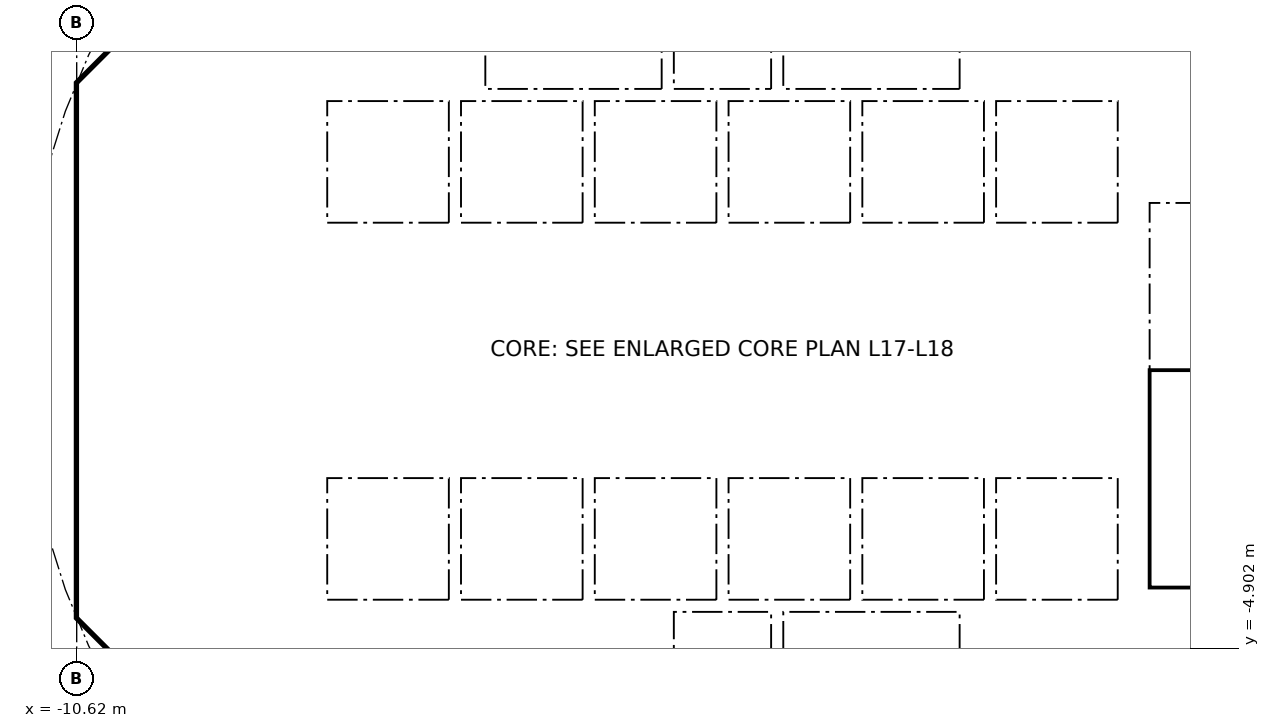
"""IFC4 building model, lengths in metres.
Left out: names, types, materials, properties, quantities, classifications, styles, units other than length and angle.
Written with IfcOpenShell. Run it as: python <this file> out.ifc"""

import sys

from ifc_helpers import new_model, si_unit, direction, frame, frame_2d, origin, place, context, subcontext, project, spatial, polyline, rectangle, outline, extrude, element, fill, save


model = new_model("IFC4")
c1 = context("Model", 3, precision=1e-05, world=origin(), true_north=direction((0.0, 1.0)))
c2 = subcontext(c1, "Body", "Model", "MODEL_VIEW")
j1 = project(units=[si_unit("LENGTHUNIT", "METRE"), si_unit("PLANEANGLEUNIT", "RADIAN")], contexts=[c1])
p1 = place(None, origin())
s1 = spatial("IfcSite", under=j1, at=p1, CompositionType="ELEMENT")
p2 = place(p1, origin())
s2 = spatial("IfcBuilding", under=s1, at=p2, CompositionType="ELEMENT")
p3 = place(p2, frame((0.0, 0.0, 73.3)))
s3 = spatial("IfcBuildingStorey", under=s2, at=p3, CompositionType="ELEMENT", Elevation=73.3)
p4 = place(p3, frame((9.988, 4.613, 0.0), z_axis=(0.0, 0.0, 1.0), x_axis=(-0.707106781187, 0.707106781187, 0.0)))
e1 = element("IfcWall", 1, at=p4, inside=s3, PredefinedType="SHEAR", context=c2, shape_type="SweptSolid", body=[
    extrude(rectangle(XDim=7.602, YDim=0.6, at=frame_2d((3.801, 0.0))), origin(), (0.0, 0.0, 1.0), 3.44),
])
p5 = place(p4, frame((3.201, 0.0, 0.0)))
e2 = element("IfcOpeningElement", 2, at=p5, cuts=e1, PredefinedType="OPENING", context=c2, shape_type="SweptSolid", body=[
    extrude(rectangle(XDim=1.2, YDim=2.1, at=frame_2d((0.6, 1.05))), frame((0.0, 0.31, 0.0), z_axis=(0.0, -1.0, 0.0), x_axis=(1.0, 0.0, 0.0)), (0.0, 0.0, 1.0), 0.62),
])
p6 = place(p3, frame((-4.613, 9.988, 0.0), z_axis=(0.0, 0.0, 1.0), x_axis=(-0.707106781187, -0.707106781187, 0.0)))
e3 = element("IfcWall", 3, at=p6, inside=s3, PredefinedType="SHEAR", context=c2, shape_type="SweptSolid", body=[
    extrude(rectangle(XDim=7.602, YDim=0.6, at=frame_2d((3.801, 0.0))), origin(), (0.0, 0.0, 1.0), 3.44),
])
p7 = place(p6, frame((0.351, 0.0, 0.0)))
e4 = element("IfcOpeningElement", 4, at=p7, cuts=e3, PredefinedType="OPENING", context=c2, shape_type="SweptSolid", body=[
    extrude(rectangle(XDim=1.1, YDim=2.1, at=frame_2d((0.55, 1.05))), frame((0.0, 0.31, 0.0), z_axis=(0.0, -1.0, 0.0), x_axis=(1.0, 0.0, 0.0)), (0.0, 0.0, 1.0), 0.62),
])
p8 = place(p3, frame((-10.325, 3.801, 0.0), z_axis=(0.0, 0.0, 1.0), x_axis=(0.0, -1.0, 0.0)))
e5 = element("IfcWall", 5, at=p8, inside=s3, PredefinedType="SHEAR", context=c2, shape_type="SweptSolid", body=[
    extrude(rectangle(XDim=7.602, YDim=0.6, at=frame_2d((3.801, 0.0))), origin(), (0.0, 0.0, 1.0), 3.44),
])
p9 = place(p8, frame((0.651, 0.0, 0.0)))
e6 = element("IfcOpeningElement", 6, at=p9, cuts=e5, PredefinedType="OPENING", context=c2, shape_type="SweptSolid", body=[
    extrude(rectangle(XDim=1.5, YDim=2.1, at=frame_2d((0.75, 1.05))), frame((0.0, 0.31, 0.0), z_axis=(0.0, -1.0, 0.0), x_axis=(1.0, 0.0, 0.0)), (0.0, 0.0, 1.0), 0.62),
])
p10 = place(p8, frame((5.451, 0.0, 0.0)))
e7 = element("IfcOpeningElement", 7, at=p10, cuts=e5, PredefinedType="OPENING", context=c2, shape_type="SweptSolid", body=[
    extrude(rectangle(XDim=1.5, YDim=2.1, at=frame_2d((0.75, 1.05))), frame((0.0, 0.31, 0.0), z_axis=(0.0, -1.0, 0.0), x_axis=(1.0, 0.0, 0.0)), (0.0, 0.0, 1.0), 0.62),
])
p11 = place(p3, frame((-9.988, -4.613, 0.0), z_axis=(0.0, 0.0, 1.0), x_axis=(0.707106781187, -0.707106781187, 0.0)))
e8 = element("IfcWall", 8, at=p11, inside=s3, PredefinedType="SHEAR", context=c2, shape_type="SweptSolid", body=[
    extrude(rectangle(XDim=7.602, YDim=0.6, at=frame_2d((3.801, 0.0))), origin(), (0.0, 0.0, 1.0), 3.44),
])
p12 = place(p11, frame((6.151, 0.0, 0.0)))
e9 = element("IfcOpeningElement", 9, at=p12, cuts=e8, PredefinedType="OPENING", context=c2, shape_type="SweptSolid", body=[
    extrude(rectangle(XDim=1.1, YDim=2.1, at=frame_2d((0.55, 1.05))), frame((0.0, 0.31, 0.0), z_axis=(0.0, -1.0, 0.0), x_axis=(1.0, 0.0, 0.0)), (0.0, 0.0, 1.0), 0.62),
])
p13 = place(p3, frame((4.613, -9.988, 0.0), z_axis=(0.0, 0.0, 1.0), x_axis=(0.707106781187, 0.707106781187, 0.0)))
e10 = element("IfcWall", 10, at=p13, inside=s3, PredefinedType="SHEAR", context=c2, shape_type="SweptSolid", body=[
    extrude(rectangle(XDim=7.602, YDim=0.6, at=frame_2d((3.801, 0.0))), origin(), (0.0, 0.0, 1.0), 3.44),
])
p14 = place(p13, frame((3.201, 0.0, 0.0)))
e11 = element("IfcOpeningElement", 11, at=p14, cuts=e10, PredefinedType="OPENING", context=c2, shape_type="SweptSolid", body=[
    extrude(rectangle(XDim=1.2, YDim=2.1, at=frame_2d((0.6, 1.05))), frame((0.0, 0.31, 0.0), z_axis=(0.0, -1.0, 0.0), x_axis=(1.0, 0.0, 0.0)), (0.0, 0.0, 1.0), 0.62),
])
p15 = place(p3, frame((-6.2, 4.3, 0.0), z_axis=(0.0, 0.0, 1.0), x_axis=(0.0, 1.0, 0.0)))
e12 = element("IfcWall", 12, at=p15, inside=s3, PredefinedType="PARTITIONING", context=c2, shape_type="SweptSolid", body=[
    extrude(rectangle(XDim=3.527, YDim=0.15, at=frame_2d((1.763, 0.0))), origin(), (0.0, 0.0, 1.0), 3.44),
])
p16 = place(p15, frame((0.262, 0.0, 0.0)))
e13 = element("IfcOpeningElement", 13, at=p16, cuts=e12, PredefinedType="OPENING", context=c2, shape_type="SweptSolid", body=[
    extrude(rectangle(XDim=0.9, YDim=2.1, at=frame_2d((0.45, 1.05))), frame((0.0, 0.085, 0.0), z_axis=(0.0, -1.0, 0.0), x_axis=(1.0, 0.0, 0.0)), (0.0, 0.0, 1.0), 0.17),
])
p17 = place(p15, frame((2.138, 0.0, 0.0)))
e14 = element("IfcOpeningElement", 14, at=p17, cuts=e12, PredefinedType="OPENING", context=c2, shape_type="SweptSolid", body=[
    extrude(rectangle(XDim=0.9, YDim=2.1, at=frame_2d((0.45, 1.05))), frame((0.0, 0.085, 0.0), z_axis=(0.0, -1.0, 0.0), x_axis=(1.0, 0.0, 0.0)), (0.0, 0.0, 1.0), 0.17),
])
p18 = place(p3, frame((4.0, 4.3, 0.0), z_axis=(0.0, 0.0, 1.0), x_axis=(0.0, 1.0, 0.0)))
e15 = element("IfcWall", 15, at=p18, inside=s3, PredefinedType="SOLIDWALL", context=c2, shape_type="SweptSolid", body=[
    extrude(rectangle(XDim=2.2, YDim=0.2, at=frame_2d((1.1, 0.0))), origin(), (0.0, 0.0, 1.0), 3.44),
])
p19 = place(p18, frame((0.55, 0.0, 0.0)))
e16 = element("IfcOpeningElement", 16, at=p19, cuts=e15, PredefinedType="OPENING", context=c2, shape_type="SweptSolid", body=[
    extrude(rectangle(XDim=1.1, YDim=2.1, at=frame_2d((0.55, 1.05))), frame((0.0, 0.11, 0.0), z_axis=(0.0, -1.0, 0.0), x_axis=(1.0, 0.0, 0.0)), (0.0, 0.0, 1.0), 0.22),
])
p20 = place(p3, frame((-4.0, 4.3, 0.0), z_axis=(0.0, 0.0, 1.0), x_axis=(0.0, 1.0, 0.0)))
e17 = element("IfcWall", 17, at=p20, inside=s3, PredefinedType="SOLIDWALL", context=c2, shape_type="SweptSolid", body=[
    extrude(rectangle(XDim=2.2, YDim=0.2, at=frame_2d((1.1, 0.0))), origin(), (0.0, 0.0, 1.0), 3.44),
])
p21 = place(p20, frame((0.55, 0.0, 0.0)))
e18 = element("IfcOpeningElement", 18, at=p21, cuts=e17, PredefinedType="OPENING", context=c2, shape_type="SweptSolid", body=[
    extrude(rectangle(XDim=1.1, YDim=2.1, at=frame_2d((0.55, 1.05))), frame((0.0, 0.11, 0.0), z_axis=(0.0, -1.0, 0.0), x_axis=(1.0, 0.0, 0.0)), (0.0, 0.0, 1.0), 0.22),
])
p22 = place(p3, frame((-6.7, 2.0, 0.0), z_axis=(0.0, 0.0, 1.0), x_axis=(1.0, 0.0, 0.0)))
e19 = element("IfcWall", 19, at=p22, inside=s3, PredefinedType="SOLIDWALL", context=c2, shape_type="SweptSolid", body=[
    extrude(rectangle(XDim=13.4, YDim=0.2, at=frame_2d((6.7, 0.0))), origin(), (0.0, 0.0, 1.0), 3.44),
])
p23 = place(p22, frame((0.65, 0.0, 0.0)))
e20 = element("IfcOpeningElement", 20, at=p23, cuts=e19, PredefinedType="OPENING", context=c2, shape_type="SweptSolid", body=[
    extrude(rectangle(XDim=1.1, YDim=2.1, at=frame_2d((0.55, 1.05))), frame((0.0, 0.11, 0.0), z_axis=(0.0, -1.0, 0.0), x_axis=(1.0, 0.0, 0.0)), (0.0, 0.0, 1.0), 0.22),
])
p24 = place(p22, frame((2.85, 0.0, 0.0)))
e21 = element("IfcOpeningElement", 21, at=p24, cuts=e19, PredefinedType="OPENING", context=c2, shape_type="SweptSolid", body=[
    extrude(rectangle(XDim=1.1, YDim=2.1, at=frame_2d((0.55, 1.05))), frame((0.0, 0.11, 0.0), z_axis=(0.0, -1.0, 0.0), x_axis=(1.0, 0.0, 0.0)), (0.0, 0.0, 1.0), 0.22),
])
p25 = place(p22, frame((5.05, 0.0, 0.0)))
e22 = element("IfcOpeningElement", 22, at=p25, cuts=e19, PredefinedType="OPENING", context=c2, shape_type="SweptSolid", body=[
    extrude(rectangle(XDim=1.1, YDim=2.1, at=frame_2d((0.55, 1.05))), frame((0.0, 0.11, 0.0), z_axis=(0.0, -1.0, 0.0), x_axis=(1.0, 0.0, 0.0)), (0.0, 0.0, 1.0), 0.22),
])
p26 = place(p3, frame((6.7, 4.0, 0.0), z_axis=(0.0, 0.0, 1.0), x_axis=(1.0, 0.0, 0.0)))
e23 = element("IfcWall", 23, at=p26, inside=s3, PredefinedType="SOLIDWALL", context=c2, shape_type="SweptSolid", body=[
    extrude(rectangle(XDim=3.325, YDim=0.2, at=frame_2d((1.662, 0.0))), origin(), (0.0, 0.0, 1.0), 3.44),
])
p27 = place(p26, frame((1.25, 0.0, 0.0)))
e24 = element("IfcOpeningElement", 24, at=p27, cuts=e23, PredefinedType="OPENING", context=c2, shape_type="SweptSolid", body=[
    extrude(rectangle(XDim=1.1, YDim=2.1, at=frame_2d((0.55, 1.05))), frame((0.0, 0.11, 0.0), z_axis=(0.0, -1.0, 0.0), x_axis=(1.0, 0.0, 0.0)), (0.0, 0.0, 1.0), 0.22),
])
p28 = place(p3, frame((-7.0, -7.027, 0.0), z_axis=(0.0, 0.0, 1.0), x_axis=(0.0, 1.0, 0.0)))
e25 = element("IfcWall", 25, at=p28, inside=s3, PredefinedType="PARTITIONING", context=c2, shape_type="SweptSolid", body=[
    extrude(rectangle(XDim=2.927, YDim=0.15, at=frame_2d((1.463, 0.0))), origin(), (0.0, 0.0, 1.0), 3.44),
])
p29 = place(p28, frame((0.976, 0.0, 0.0)))
e26 = element("IfcOpeningElement", 26, at=p29, cuts=e25, PredefinedType="OPENING", context=c2, shape_type="SweptSolid", body=[
    extrude(rectangle(XDim=0.9, YDim=2.1, at=frame_2d((0.45, 1.05))), frame((0.0, 0.085, 0.0), z_axis=(0.0, -1.0, 0.0), x_axis=(1.0, 0.0, 0.0)), (0.0, 0.0, 1.0), 0.17),
])
p30 = place(p3, frame((4.0, -6.5, 0.0), z_axis=(0.0, 0.0, 1.0), x_axis=(0.0, 1.0, 0.0)))
e27 = element("IfcWall", 27, at=p30, inside=s3, PredefinedType="SOLIDWALL", context=c2, shape_type="SweptSolid", body=[
    extrude(rectangle(XDim=2.2, YDim=0.2, at=frame_2d((1.1, 0.0))), origin(), (0.0, 0.0, 1.0), 3.44),
])
p31 = place(p30, frame((0.55, 0.0, 0.0)))
e28 = element("IfcOpeningElement", 28, at=p31, cuts=e27, PredefinedType="OPENING", context=c2, shape_type="SweptSolid", body=[
    extrude(rectangle(XDim=1.1, YDim=2.1, at=frame_2d((0.55, 1.05))), frame((0.0, 0.11, 0.0), z_axis=(0.0, -1.0, 0.0), x_axis=(1.0, 0.0, 0.0)), (0.0, 0.0, 1.0), 0.22),
])
p32 = place(p3, frame((-4.0, -6.5, 0.0), z_axis=(0.0, 0.0, 1.0), x_axis=(0.0, 1.0, 0.0)))
e29 = element("IfcWall", 29, at=p32, inside=s3, PredefinedType="SOLIDWALL", context=c2, shape_type="SweptSolid", body=[
    extrude(rectangle(XDim=2.2, YDim=0.2, at=frame_2d((1.1, 0.0))), origin(), (0.0, 0.0, 1.0), 3.44),
])
p33 = place(p32, frame((0.65, 0.0, 0.0)))
e30 = element("IfcOpeningElement", 30, at=p33, cuts=e29, PredefinedType="OPENING", context=c2, shape_type="SweptSolid", body=[
    extrude(rectangle(XDim=0.9, YDim=2.1, at=frame_2d((0.45, 1.05))), frame((0.0, 0.11, 0.0), z_axis=(0.0, -1.0, 0.0), x_axis=(1.0, 0.0, 0.0)), (0.0, 0.0, 1.0), 0.22),
])
p34 = place(p3, frame((-6.7, -2.0, 0.0), z_axis=(0.0, 0.0, 1.0), x_axis=(1.0, 0.0, 0.0)))
e31 = element("IfcWall", 31, at=p34, inside=s3, PredefinedType="SOLIDWALL", context=c2, shape_type="SweptSolid", body=[
    extrude(rectangle(XDim=13.4, YDim=0.2, at=frame_2d((6.7, 0.0))), origin(), (0.0, 0.0, 1.0), 3.44),
])
p35 = place(p34, frame((0.65, 0.0, 0.0)))
e32 = element("IfcOpeningElement", 32, at=p35, cuts=e31, PredefinedType="OPENING", context=c2, shape_type="SweptSolid", body=[
    extrude(rectangle(XDim=1.1, YDim=2.1, at=frame_2d((0.55, 1.05))), frame((0.0, 0.11, 0.0), z_axis=(0.0, -1.0, 0.0), x_axis=(1.0, 0.0, 0.0)), (0.0, 0.0, 1.0), 0.22),
])
p36 = place(p34, frame((2.85, 0.0, 0.0)))
e33 = element("IfcOpeningElement", 33, at=p36, cuts=e31, PredefinedType="OPENING", context=c2, shape_type="SweptSolid", body=[
    extrude(rectangle(XDim=1.1, YDim=2.1, at=frame_2d((0.55, 1.05))), frame((0.0, 0.11, 0.0), z_axis=(0.0, -1.0, 0.0), x_axis=(1.0, 0.0, 0.0)), (0.0, 0.0, 1.0), 0.22),
])
p37 = place(p3, origin())
e34 = element("IfcWall", 34, at=p37, inside=s3, PredefinedType="SHEAR", context=c2, shape_type="SweptSolid", body=[
    extrude(outline(polyline([(-10.625, -3.801), (-10.025, -3.801), (-10.025, -4.152), (-9.776, -4.401), (-10.2, -4.825), (-10.625, -4.401), (-10.625, -3.801)])), origin(), (0.0, 0.0, 1.0), 3.44),
])
p38 = place(p3, origin())
e35 = element("IfcWall", 35, at=p38, inside=s3, PredefinedType="SHEAR", context=c2, shape_type="SweptSolid", body=[
    extrude(outline(polyline([(-10.2, 4.825), (-9.776, 4.401), (-10.025, 4.152), (-10.025, 3.801), (-10.625, 3.801), (-10.625, 4.401), (-10.2, 4.825)])), origin(), (0.0, 0.0, 1.0), 3.44),
])
for number, where, z_axis, x_axis in (
    (36, (-10.025, -4.0, 0.0), (0.0, 0.0, 1.0), (1.0, 0.0, 0.0)),
    (37, (-10.025, 4.0, 0.0), (0.0, 0.0, 1.0), (1.0, 0.0, 0.0)),
):
    element("IfcWall", number, at=place(p3, frame(where, z_axis=z_axis, x_axis=x_axis)), inside=s3, PredefinedType="PARTITIONING", context=c2, shape_type="SweptSolid", body=[
        extrude(rectangle(XDim=3.325, YDim=0.2, at=frame_2d((1.662, 0.0))), origin(), (0.0, 0.0, 1.0), 3.44),
    ])
for number, where, z_axis, x_axis in (
    (38, (-0.9, -6.5, 0.0), (0.0, 0.0, 1.0), (0.0, 1.0, 0.0)),
    (39, (0.9, -6.5, 0.0), (0.0, 0.0, 1.0), (0.0, 1.0, 0.0)),
):
    element("IfcWall", number, at=place(p3, frame(where, z_axis=z_axis, x_axis=x_axis)), inside=s3, PredefinedType="SOLIDWALL", context=c2, shape_type="SweptSolid", body=[
        extrude(rectangle(XDim=2.2, YDim=0.2, at=frame_2d((1.1, 0.0))), origin(), (0.0, 0.0, 1.0), 3.44),
    ])
p39 = place(p3, origin())
e40 = element("IfcWall", 40, at=p39, inside=s3, PredefinedType="SOLIDWALL", context=c2, shape_type="SweptSolid", body=[
    extrude(outline(polyline([(-6.7, -2.1), (-6.5, -2.1), (-6.5, -4.1), (-4.5, -4.1), (-4.5, -2.1), (-4.3, -2.1), (-4.3, -4.1), (-2.3, -4.1), (-2.3, -2.1), (-2.1, -2.1), (-2.1, -4.1), (-0.1, -4.1), (-0.1, -2.1), (0.1, -2.1), (0.1, -4.1), (2.1, -4.1), (2.1, -2.1), (2.3, -2.1), (2.3, -4.1), (4.3, -4.1), (4.3, -2.1), (4.5, -2.1), (4.5, -4.1), (6.5, -4.1), (6.5, -2.1), (6.7, -2.1), (6.7, -4.3), (-6.7, -4.3), (-6.7, -2.1)])), origin(), (0.0, 0.0, 1.0), 3.44),
])
for number, where, z_axis, x_axis in (
    (41, (-0.9, 4.3, 0.0), (0.0, 0.0, 1.0), (0.0, 1.0, 0.0)),
    (42, (0.9, 4.3, 0.0), (0.0, 0.0, 1.0), (0.0, 1.0, 0.0)),
):
    element("IfcWall", number, at=place(p3, frame(where, z_axis=z_axis, x_axis=x_axis)), inside=s3, PredefinedType="SOLIDWALL", context=c2, shape_type="SweptSolid", body=[
        extrude(rectangle(XDim=2.2, YDim=0.2, at=frame_2d((1.1, 0.0))), origin(), (0.0, 0.0, 1.0), 3.44),
    ])
p40 = place(p3, origin())
e43 = element("IfcWall", 43, at=p40, inside=s3, PredefinedType="SOLIDWALL", context=c2, shape_type="SweptSolid", body=[
    extrude(outline(polyline([(-6.5, 2.1), (-6.7, 2.1), (-6.7, 4.3), (6.7, 4.3), (6.7, 2.1), (6.5, 2.1), (6.5, 4.1), (4.5, 4.1), (4.5, 2.1), (4.3, 2.1), (4.3, 4.1), (2.3, 4.1), (2.3, 2.1), (2.1, 2.1), (2.1, 4.1), (0.1, 4.1), (0.1, 2.1), (-0.1, 2.1), (-0.1, 4.1), (-2.1, 4.1), (-2.1, 2.1), (-2.3, 2.1), (-2.3, 4.1), (-4.3, 4.1), (-4.3, 2.1), (-4.5, 2.1), (-4.5, 4.1), (-6.5, 4.1), (-6.5, 2.1)])), origin(), (0.0, 0.0, 1.0), 3.44),
])
p41 = place(p3, origin())
e44 = element("IfcWall", 44, at=p41, inside=s3, PredefinedType="SOLIDWALL", context=c2, shape_type="SweptSolid", body=[
    extrude(outline(polyline([(7.025, -3.9), (6.7, -3.9), (6.7, 3.9), (7.025, 3.9), (7.025, -3.9)])), origin(), (0.0, 0.0, 1.0), 3.44),
])
p42 = place(p3, origin())
e45 = element("IfcWall", 45, at=p42, inside=s3, PredefinedType="SOLIDWALL", context=c2, shape_type="SweptSolid", body=[
    extrude(outline(polyline([(10.025, -4.1), (6.7, -4.1), (6.7, -3.9), (10.025, -3.9), (10.025, -4.1)])), origin(), (0.0, 0.0, 1.0), 3.44),
])
p43 = place(p23, origin())
e46 = element("IfcDoor", 46, at=p43, inside=s3, OperationType="DOUBLE_DOOR_SLIDING", PredefinedType="DOOR", context=c2, shape_type="SweptSolid", body=[
    extrude(rectangle(XDim=1.1, YDim=2.1, at=frame_2d((0.55, 1.05))), frame((0.0, 0.025, 0.0), z_axis=(0.0, -1.0, 0.0), x_axis=(1.0, 0.0, 0.0)), (0.0, 0.0, 1.0), 0.05),
])
fill(e20, e46)
p44 = place(p24, origin())
e47 = element("IfcDoor", 47, at=p44, inside=s3, OperationType="DOUBLE_DOOR_SLIDING", PredefinedType="DOOR", context=c2, shape_type="SweptSolid", body=[
    extrude(rectangle(XDim=1.1, YDim=2.1, at=frame_2d((0.55, 1.05))), frame((0.0, 0.025, 0.0), z_axis=(0.0, -1.0, 0.0), x_axis=(1.0, 0.0, 0.0)), (0.0, 0.0, 1.0), 0.05),
])
fill(e21, e47)
p45 = place(p25, origin())
e48 = element("IfcDoor", 48, at=p45, inside=s3, OperationType="DOUBLE_DOOR_SLIDING", PredefinedType="DOOR", context=c2, shape_type="SweptSolid", body=[
    extrude(rectangle(XDim=1.1, YDim=2.1, at=frame_2d((0.55, 1.05))), frame((0.0, 0.025, 0.0), z_axis=(0.0, -1.0, 0.0), x_axis=(1.0, 0.0, 0.0)), (0.0, 0.0, 1.0), 0.05),
])
fill(e22, e48)
p46 = place(p35, origin())
e49 = element("IfcDoor", 49, at=p46, inside=s3, OperationType="DOUBLE_DOOR_SLIDING", PredefinedType="DOOR", context=c2, shape_type="SweptSolid", body=[
    extrude(rectangle(XDim=1.1, YDim=2.1, at=frame_2d((0.55, 1.05))), frame((0.0, 0.025, 0.0), z_axis=(0.0, -1.0, 0.0), x_axis=(1.0, 0.0, 0.0)), (0.0, 0.0, 1.0), 0.05),
])
fill(e32, e49)
p47 = place(p36, origin())
e50 = element("IfcDoor", 50, at=p47, inside=s3, OperationType="DOUBLE_DOOR_SLIDING", PredefinedType="DOOR", context=c2, shape_type="SweptSolid", body=[
    extrude(rectangle(XDim=1.1, YDim=2.1, at=frame_2d((0.55, 1.05))), frame((0.0, 0.025, 0.0), z_axis=(0.0, -1.0, 0.0), x_axis=(1.0, 0.0, 0.0)), (0.0, 0.0, 1.0), 0.05),
])
fill(e33, e50)
p48 = place(p19, origin())
e51 = element("IfcDoor", 51, at=p48, inside=s3, OperationType="DOUBLE_DOOR_SLIDING", PredefinedType="DOOR", context=c2, shape_type="SweptSolid", body=[
    extrude(rectangle(XDim=1.1, YDim=2.1, at=frame_2d((0.55, 1.05))), frame((0.0, 0.025, 0.0), z_axis=(0.0, -1.0, 0.0), x_axis=(1.0, 0.0, 0.0)), (0.0, 0.0, 1.0), 0.05),
])
fill(e16, e51)
p49 = place(p31, origin())
e52 = element("IfcDoor", 52, at=p49, inside=s3, OperationType="DOUBLE_DOOR_SLIDING", PredefinedType="DOOR", context=c2, shape_type="SweptSolid", body=[
    extrude(rectangle(XDim=1.1, YDim=2.1, at=frame_2d((0.55, 1.05))), frame((0.0, 0.025, 0.0), z_axis=(0.0, -1.0, 0.0), x_axis=(1.0, 0.0, 0.0)), (0.0, 0.0, 1.0), 0.05),
])
fill(e28, e52)
p50 = place(p21, origin())
e53 = element("IfcDoor", 53, at=p50, inside=s3, OperationType="DOUBLE_DOOR_SLIDING", PredefinedType="DOOR", context=c2, shape_type="SweptSolid", body=[
    extrude(rectangle(XDim=1.1, YDim=2.1, at=frame_2d((0.55, 1.05))), frame((0.0, 0.025, 0.0), z_axis=(0.0, -1.0, 0.0), x_axis=(1.0, 0.0, 0.0)), (0.0, 0.0, 1.0), 0.05),
])
fill(e18, e53)
p51 = place(p16, origin())
e54 = element("IfcDoor", 54, at=p51, inside=s3, OperationType="SINGLE_SWING_RIGHT", PredefinedType="DOOR", context=c2, shape_type="SweptSolid", body=[
    extrude(rectangle(XDim=0.9, YDim=2.1, at=frame_2d((0.45, 1.05))), frame((0.0, 0.025, 0.0), z_axis=(0.0, -1.0, 0.0), x_axis=(1.0, 0.0, 0.0)), (0.0, 0.0, 1.0), 0.05),
])
fill(e13, e54)
p52 = place(p9, origin())
e55 = element("IfcDoor", 55, at=p52, inside=s3, OperationType="DOUBLE_DOOR_SINGLE_SWING", PredefinedType="DOOR", context=c2, shape_type="SweptSolid", body=[
    extrude(rectangle(XDim=1.5, YDim=2.1, at=frame_2d((0.75, 1.05))), frame((0.0, 0.025, 0.0), z_axis=(0.0, -1.0, 0.0), x_axis=(1.0, 0.0, 0.0)), (0.0, 0.0, 1.0), 0.05),
])
fill(e6, e55)
p53 = place(p10, origin())
e56 = element("IfcDoor", 56, at=p53, inside=s3, OperationType="DOUBLE_DOOR_SINGLE_SWING", PredefinedType="DOOR", context=c2, shape_type="SweptSolid", body=[
    extrude(rectangle(XDim=1.5, YDim=2.1, at=frame_2d((0.75, 1.05))), frame((0.0, 0.025, 0.0), z_axis=(0.0, -1.0, 0.0), x_axis=(1.0, 0.0, 0.0)), (0.0, 0.0, 1.0), 0.05),
])
fill(e7, e56)
save(model, sys.argv[1])
